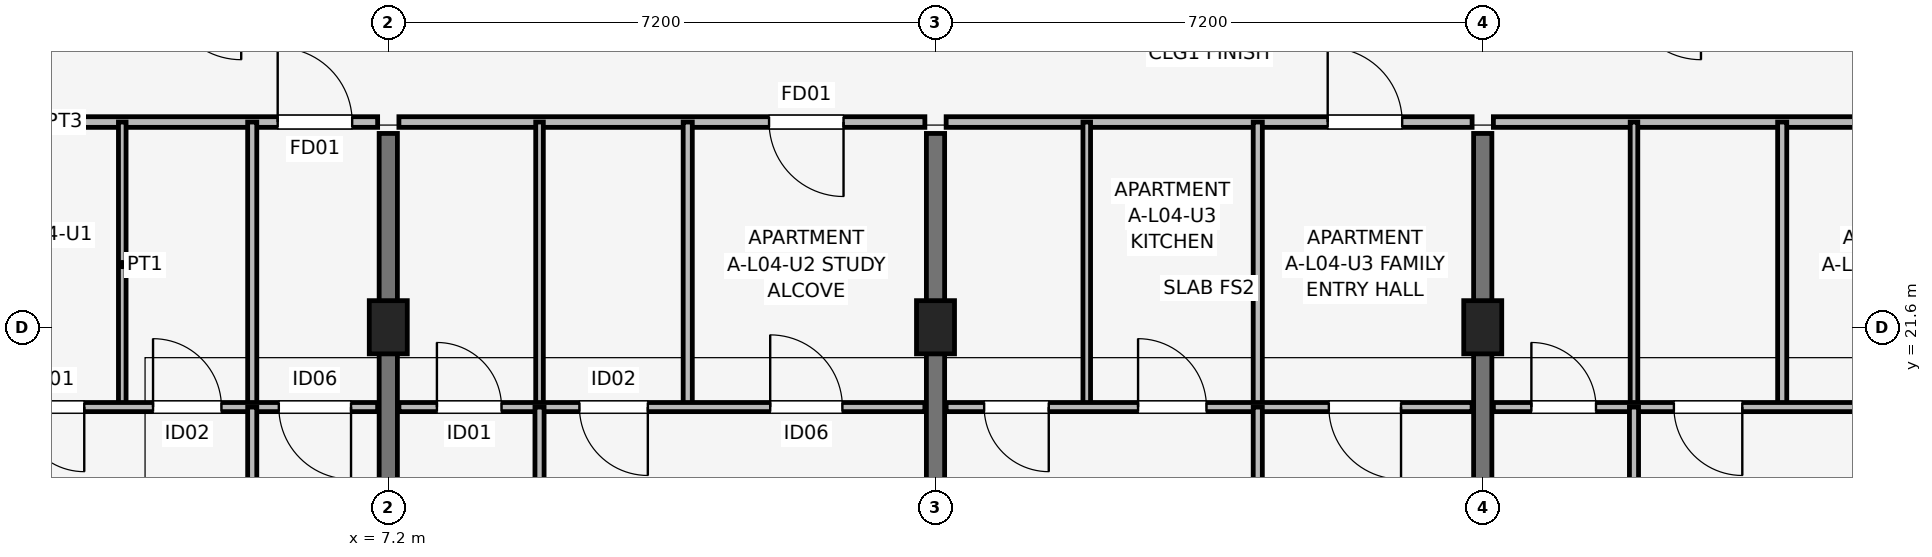
"""IFC4 building model, lengths in metres.
Left out: names, types, materials, properties, quantities, classifications, styles, units other than length and angle.
Written with IfcOpenShell. Run it as: python <this file> out.ifc"""

import sys

from ifc_helpers import new_model, si_unit, direction, frame, frame_2d, origin, origin_2d, place, context, subcontext, project, spatial, rectangle, extrude, element, fill, save


model = new_model("IFC4")
c1 = context("Model", 3, precision=1e-05, world=origin(), true_north=direction((0.0, 1.0)))
c2 = subcontext(c1, "Body", "Model", "MODEL_VIEW")
j1 = project(units=[si_unit("LENGTHUNIT", "METRE"), si_unit("PLANEANGLEUNIT", "RADIAN")], contexts=[c1])
p1 = place(None, origin())
s1 = spatial("IfcSite", under=j1, at=p1, CompositionType="ELEMENT")
p2 = place(p1, origin())
s2 = spatial("IfcBuilding", under=s1, at=p2, CompositionType="ELEMENT")
p3 = place(p2, frame((0.0, 0.0, 15.0)))
s3 = spatial("IfcBuildingStorey", under=s2, at=p3, CompositionType="ELEMENT", Elevation=15.0)
for number, where, z_axis, x_axis in (
    (1, (7.2, 21.6, 0.0), (0.0, 0.0, 1.0), (1.0, 0.0, 0.0)),
    (2, (14.4, 21.6, 0.0), (0.0, 0.0, 1.0), (1.0, 0.0, 0.0)),
    (3, (21.6, 21.6, 0.0), (0.0, 0.0, 1.0), (1.0, 0.0, 0.0)),
):
    element("IfcColumn", number, at=place(p3, frame(where, z_axis=z_axis, x_axis=x_axis)), inside=s3, PredefinedType="COLUMN", context=c2, shape_type="SweptSolid", body=[
        extrude(rectangle(XDim=0.5, YDim=0.7, at=origin_2d()), origin(), (0.0, 0.0, 1.0), 3.15),
    ])
for number, where, z_axis, x_axis in (
    (4, (7.2, 14.75, 0.0), (0.0, 0.0, 1.0), (0.0, 1.0, 0.0)),
    (5, (14.4, 14.75, 0.0), (0.0, 0.0, 1.0), (0.0, 1.0, 0.0)),
    (6, (21.6, 14.75, 0.0), (0.0, 0.0, 1.0), (0.0, 1.0, 0.0)),
):
    element("IfcWall", number, at=place(p3, frame(where, z_axis=z_axis, x_axis=x_axis)), inside=s3, PredefinedType="SHEAR", context=c2, shape_type="SweptSolid", body=[
        extrude(rectangle(XDim=9.4, YDim=0.24, at=frame_2d((4.7, 0.0))), origin(), (0.0, 0.0, 1.0), 3.15),
    ])
p4 = place(p3, frame((0.14, 24.3, 0.0), z_axis=(0.0, 0.0, 1.0), x_axis=(1.0, 0.0, 0.0)))
e7 = element("IfcWall", 7, at=p4, inside=s3, PredefinedType="PARTITIONING", context=c2, shape_type="SweptSolid", body=[
    extrude(rectangle(XDim=6.92, YDim=0.14, at=frame_2d((3.46, 0.0))), origin(), (0.0, 0.0, 1.0), 2.38),
])
p5 = place(p4, frame((5.605, 0.0, 0.0)))
e8 = element("IfcOpeningElement", 8, at=p5, cuts=e7, PredefinedType="OPENING", context=c2, shape_type="SweptSolid", body=[
    extrude(rectangle(XDim=0.98, YDim=2.1, at=frame_2d((0.49, 1.05))), frame((0.0, 0.08, 0.0), z_axis=(0.0, -1.0, 0.0), x_axis=(1.0, 0.0, 0.0)), (0.0, 0.0, 1.0), 0.16),
])
p6 = place(p3, frame((3.7, 20.55, 0.0), z_axis=(0.0, 0.0, 1.0), x_axis=(0.0, 1.0, 0.0)))
e9 = element("IfcWall", 9, at=p6, inside=s3, PredefinedType="PARTITIONING", context=c2, shape_type="SweptSolid", body=[
    extrude(rectangle(XDim=3.75, YDim=0.1, at=frame_2d((1.875, 0.0))), origin(), (0.0, 0.0, 1.0), 2.375),
])
p7 = place(p3, frame((5.41, 20.55, 0.0), z_axis=(0.0, 0.0, 1.0), x_axis=(0.0, 1.0, 0.0)))
e10 = element("IfcWall", 10, at=p7, inside=s3, PredefinedType="PARTITIONING", context=c2, shape_type="SweptSolid", body=[
    extrude(rectangle(XDim=3.75, YDim=0.12, at=frame_2d((1.875, 0.0))), origin(), (0.0, 0.0, 1.0), 2.375),
])
p8 = place(p3, frame((0.14, 20.55, 0.0), z_axis=(0.0, 0.0, 1.0), x_axis=(1.0, 0.0, 0.0)))
e11 = element("IfcWall", 11, at=p8, inside=s3, PredefinedType="PARTITIONING", context=c2, shape_type="SweptSolid", body=[
    extrude(rectangle(XDim=6.92, YDim=0.12, at=frame_2d((3.46, 0.0))), origin(), (0.0, 0.0, 1.0), 2.38),
])
p9 = place(p8, frame((3.06, 0.0, 0.0), z_axis=(0.0, 0.0, 1.0), x_axis=(-1.0, 0.0, 0.0)))
e12 = element("IfcOpeningElement", 12, at=p9, cuts=e11, PredefinedType="OPENING", context=c2, shape_type="SweptSolid", body=[
    extrude(rectangle(XDim=0.85, YDim=2.08, at=frame_2d((0.425, 1.04))), frame((0.0, 0.07, 0.0), z_axis=(0.0, -1.0, 0.0), x_axis=(1.0, 0.0, 0.0)), (0.0, 0.0, 1.0), 0.14),
])
p10 = place(p8, frame((3.965, 0.0, 0.0)))
e13 = element("IfcOpeningElement", 13, at=p10, cuts=e11, PredefinedType="OPENING", context=c2, shape_type="SweptSolid", body=[
    extrude(rectangle(XDim=0.9, YDim=2.08, at=frame_2d((0.45, 1.04))), frame((0.0, 0.07, 0.0), z_axis=(0.0, -1.0, 0.0), x_axis=(1.0, 0.0, 0.0)), (0.0, 0.0, 1.0), 0.14),
])
p11 = place(p8, frame((6.57, 0.0, 0.0), z_axis=(0.0, 0.0, 1.0), x_axis=(-1.0, 0.0, 0.0)))
e14 = element("IfcOpeningElement", 14, at=p11, cuts=e11, PredefinedType="OPENING", context=c2, shape_type="SweptSolid", body=[
    extrude(rectangle(XDim=0.95, YDim=2.08, at=frame_2d((0.475, 1.04))), frame((0.0, 0.07, 0.0), z_axis=(0.0, -1.0, 0.0), x_axis=(1.0, 0.0, 0.0)), (0.0, 0.0, 1.0), 0.14),
])
p12 = place(p3, frame((5.41, 14.7, 0.0), z_axis=(0.0, 0.0, 1.0), x_axis=(0.0, 1.0, 0.0)))
e15 = element("IfcWall", 15, at=p12, inside=s3, PredefinedType="PARTITIONING", context=c2, shape_type="SweptSolid", body=[
    extrude(rectangle(XDim=5.85, YDim=0.12, at=frame_2d((2.925, 0.0))), origin(), (0.0, 0.0, 1.0), 2.38),
])
p13 = place(p12, frame((2.475, 0.0, 0.0)))
e16 = element("IfcOpeningElement", 16, at=p13, cuts=e15, PredefinedType="OPENING", context=c2, shape_type="SweptSolid", body=[
    extrude(rectangle(XDim=0.9, YDim=2.08, at=frame_2d((0.45, 1.04))), frame((0.0, 0.07, 0.0), z_axis=(0.0, -1.0, 0.0), x_axis=(1.0, 0.0, 0.0)), (0.0, 0.0, 1.0), 0.14),
])
p14 = place(p3, frame((7.34, 24.3, 0.0), z_axis=(0.0, 0.0, 1.0), x_axis=(1.0, 0.0, 0.0)))
e17 = element("IfcWall", 17, at=p14, inside=s3, PredefinedType="PARTITIONING", context=c2, shape_type="SweptSolid", body=[
    extrude(rectangle(XDim=6.92, YDim=0.14, at=frame_2d((3.46, 0.0))), origin(), (0.0, 0.0, 1.0), 2.38),
])
p15 = place(p14, frame((5.85, 0.0, 0.0), z_axis=(0.0, 0.0, 1.0), x_axis=(-1.0, 0.0, 0.0)))
e18 = element("IfcOpeningElement", 18, at=p15, cuts=e17, PredefinedType="OPENING", context=c2, shape_type="SweptSolid", body=[
    extrude(rectangle(XDim=0.98, YDim=2.1, at=frame_2d((0.49, 1.05))), frame((0.0, 0.08, 0.0), z_axis=(0.0, -1.0, 0.0), x_axis=(1.0, 0.0, 0.0)), (0.0, 0.0, 1.0), 0.16),
])
p16 = place(p3, frame((9.19, 20.55, 0.0), z_axis=(0.0, 0.0, 1.0), x_axis=(0.0, 1.0, 0.0)))
e19 = element("IfcWall", 19, at=p16, inside=s3, PredefinedType="PARTITIONING", context=c2, shape_type="SweptSolid", body=[
    extrude(rectangle(XDim=3.75, YDim=0.1, at=frame_2d((1.875, 0.0))), origin(), (0.0, 0.0, 1.0), 2.375),
])
p17 = place(p3, frame((11.14, 20.55, 0.0), z_axis=(0.0, 0.0, 1.0), x_axis=(0.0, 1.0, 0.0)))
e20 = element("IfcWall", 20, at=p17, inside=s3, PredefinedType="PARTITIONING", context=c2, shape_type="SweptSolid", body=[
    extrude(rectangle(XDim=3.75, YDim=0.12, at=frame_2d((1.875, 0.0))), origin(), (0.0, 0.0, 1.0), 2.375),
])
p18 = place(p3, frame((7.34, 20.55, 0.0), z_axis=(0.0, 0.0, 1.0), x_axis=(1.0, 0.0, 0.0)))
e21 = element("IfcWall", 21, at=p18, inside=s3, PredefinedType="PARTITIONING", context=c2, shape_type="SweptSolid", body=[
    extrude(rectangle(XDim=6.92, YDim=0.12, at=frame_2d((3.46, 0.0))), origin(), (0.0, 0.0, 1.0), 2.38),
])
p19 = place(p18, frame((0.5, 0.0, 0.0)))
e22 = element("IfcOpeningElement", 22, at=p19, cuts=e21, PredefinedType="OPENING", context=c2, shape_type="SweptSolid", body=[
    extrude(rectangle(XDim=0.85, YDim=2.08, at=frame_2d((0.425, 1.04))), frame((0.0, 0.07, 0.0), z_axis=(0.0, -1.0, 0.0), x_axis=(1.0, 0.0, 0.0)), (0.0, 0.0, 1.0), 0.14),
])
p20 = place(p18, frame((3.275, 0.0, 0.0), z_axis=(0.0, 0.0, 1.0), x_axis=(-1.0, 0.0, 0.0)))
e23 = element("IfcOpeningElement", 23, at=p20, cuts=e21, PredefinedType="OPENING", context=c2, shape_type="SweptSolid", body=[
    extrude(rectangle(XDim=0.9, YDim=2.08, at=frame_2d((0.45, 1.04))), frame((0.0, 0.07, 0.0), z_axis=(0.0, -1.0, 0.0), x_axis=(1.0, 0.0, 0.0)), (0.0, 0.0, 1.0), 0.14),
])
p21 = place(p18, frame((4.885, 0.0, 0.0)))
e24 = element("IfcOpeningElement", 24, at=p21, cuts=e21, PredefinedType="OPENING", context=c2, shape_type="SweptSolid", body=[
    extrude(rectangle(XDim=0.95, YDim=2.08, at=frame_2d((0.475, 1.04))), frame((0.0, 0.07, 0.0), z_axis=(0.0, -1.0, 0.0), x_axis=(1.0, 0.0, 0.0)), (0.0, 0.0, 1.0), 0.14),
])
p22 = place(p3, frame((9.19, 14.7, 0.0), z_axis=(0.0, 0.0, 1.0), x_axis=(0.0, 1.0, 0.0)))
e25 = element("IfcWall", 25, at=p22, inside=s3, PredefinedType="PARTITIONING", context=c2, shape_type="SweptSolid", body=[
    extrude(rectangle(XDim=5.85, YDim=0.12, at=frame_2d((2.925, 0.0))), origin(), (0.0, 0.0, 1.0), 2.38),
])
p23 = place(p22, frame((3.375, 0.0, 0.0), z_axis=(0.0, 0.0, 1.0), x_axis=(-1.0, 0.0, 0.0)))
e26 = element("IfcOpeningElement", 26, at=p23, cuts=e25, PredefinedType="OPENING", context=c2, shape_type="SweptSolid", body=[
    extrude(rectangle(XDim=0.9, YDim=2.08, at=frame_2d((0.45, 1.04))), frame((0.0, 0.07, 0.0), z_axis=(0.0, -1.0, 0.0), x_axis=(1.0, 0.0, 0.0)), (0.0, 0.0, 1.0), 0.14),
])
p24 = place(p3, frame((14.54, 24.3, 0.0), z_axis=(0.0, 0.0, 1.0), x_axis=(1.0, 0.0, 0.0)))
e27 = element("IfcWall", 27, at=p24, inside=s3, PredefinedType="PARTITIONING", context=c2, shape_type="SweptSolid", body=[
    extrude(rectangle(XDim=6.92, YDim=0.14, at=frame_2d((3.46, 0.0))), origin(), (0.0, 0.0, 1.0), 2.38),
])
p25 = place(p24, frame((5.02, 0.0, 0.0)))
e28 = element("IfcOpeningElement", 28, at=p25, cuts=e27, PredefinedType="OPENING", context=c2, shape_type="SweptSolid", body=[
    extrude(rectangle(XDim=0.98, YDim=2.1, at=frame_2d((0.49, 1.05))), frame((0.0, 0.08, 0.0), z_axis=(0.0, -1.0, 0.0), x_axis=(1.0, 0.0, 0.0)), (0.0, 0.0, 1.0), 0.16),
])
p26 = place(p3, frame((16.39, 20.55, 0.0), z_axis=(0.0, 0.0, 1.0), x_axis=(0.0, 1.0, 0.0)))
e29 = element("IfcWall", 29, at=p26, inside=s3, PredefinedType="PARTITIONING", context=c2, shape_type="SweptSolid", body=[
    extrude(rectangle(XDim=3.75, YDim=0.1, at=frame_2d((1.875, 0.0))), origin(), (0.0, 0.0, 1.0), 2.375),
])
p27 = place(p3, frame((18.64, 20.55, 0.0), z_axis=(0.0, 0.0, 1.0), x_axis=(0.0, 1.0, 0.0)))
e30 = element("IfcWall", 30, at=p27, inside=s3, PredefinedType="PARTITIONING", context=c2, shape_type="SweptSolid", body=[
    extrude(rectangle(XDim=3.75, YDim=0.12, at=frame_2d((1.875, 0.0))), origin(), (0.0, 0.0, 1.0), 2.375),
])
p28 = place(p3, frame((14.54, 20.55, 0.0), z_axis=(0.0, 0.0, 1.0), x_axis=(1.0, 0.0, 0.0)))
e31 = element("IfcWall", 31, at=p28, inside=s3, PredefinedType="PARTITIONING", context=c2, shape_type="SweptSolid", body=[
    extrude(rectangle(XDim=6.92, YDim=0.12, at=frame_2d((3.46, 0.0))), origin(), (0.0, 0.0, 1.0), 2.38),
])
p29 = place(p28, frame((1.35, 0.0, 0.0), z_axis=(0.0, 0.0, 1.0), x_axis=(-1.0, 0.0, 0.0)))
e32 = element("IfcOpeningElement", 32, at=p29, cuts=e31, PredefinedType="OPENING", context=c2, shape_type="SweptSolid", body=[
    extrude(rectangle(XDim=0.85, YDim=2.08, at=frame_2d((0.425, 1.04))), frame((0.0, 0.07, 0.0), z_axis=(0.0, -1.0, 0.0), x_axis=(1.0, 0.0, 0.0)), (0.0, 0.0, 1.0), 0.14),
])
p30 = place(p28, frame((2.525, 0.0, 0.0)))
e33 = element("IfcOpeningElement", 33, at=p30, cuts=e31, PredefinedType="OPENING", context=c2, shape_type="SweptSolid", body=[
    extrude(rectangle(XDim=0.9, YDim=2.08, at=frame_2d((0.45, 1.04))), frame((0.0, 0.07, 0.0), z_axis=(0.0, -1.0, 0.0), x_axis=(1.0, 0.0, 0.0)), (0.0, 0.0, 1.0), 0.14),
])
p31 = place(p28, frame((5.985, 0.0, 0.0), z_axis=(0.0, 0.0, 1.0), x_axis=(-1.0, 0.0, 0.0)))
e34 = element("IfcOpeningElement", 34, at=p31, cuts=e31, PredefinedType="OPENING", context=c2, shape_type="SweptSolid", body=[
    extrude(rectangle(XDim=0.95, YDim=2.08, at=frame_2d((0.475, 1.04))), frame((0.0, 0.07, 0.0), z_axis=(0.0, -1.0, 0.0), x_axis=(1.0, 0.0, 0.0)), (0.0, 0.0, 1.0), 0.14),
])
p32 = place(p3, frame((18.64, 14.7, 0.0), z_axis=(0.0, 0.0, 1.0), x_axis=(0.0, 1.0, 0.0)))
e35 = element("IfcWall", 35, at=p32, inside=s3, PredefinedType="PARTITIONING", context=c2, shape_type="SweptSolid", body=[
    extrude(rectangle(XDim=5.85, YDim=0.12, at=frame_2d((2.925, 0.0))), origin(), (0.0, 0.0, 1.0), 2.38),
])
p33 = place(p32, frame((2.475, 0.0, 0.0)))
e36 = element("IfcOpeningElement", 36, at=p33, cuts=e35, PredefinedType="OPENING", context=c2, shape_type="SweptSolid", body=[
    extrude(rectangle(XDim=0.9, YDim=2.08, at=frame_2d((0.45, 1.04))), frame((0.0, 0.07, 0.0), z_axis=(0.0, -1.0, 0.0), x_axis=(1.0, 0.0, 0.0)), (0.0, 0.0, 1.0), 0.14),
])
p34 = place(p3, frame((21.74, 24.3, 0.0), z_axis=(0.0, 0.0, 1.0), x_axis=(1.0, 0.0, 0.0)))
e37 = element("IfcWall", 37, at=p34, inside=s3, PredefinedType="PARTITIONING", context=c2, shape_type="SweptSolid", body=[
    extrude(rectangle(XDim=6.92, YDim=0.14, at=frame_2d((3.46, 0.0))), origin(), (0.0, 0.0, 1.0), 2.38),
])
p35 = place(p34, frame((5.85, 0.0, 0.0), z_axis=(0.0, 0.0, 1.0), x_axis=(-1.0, 0.0, 0.0)))
e38 = element("IfcOpeningElement", 38, at=p35, cuts=e37, PredefinedType="OPENING", context=c2, shape_type="SweptSolid", body=[
    extrude(rectangle(XDim=0.98, YDim=2.1, at=frame_2d((0.49, 1.05))), frame((0.0, 0.08, 0.0), z_axis=(0.0, -1.0, 0.0), x_axis=(1.0, 0.0, 0.0)), (0.0, 0.0, 1.0), 0.16),
])
p36 = place(p3, frame((23.59, 20.55, 0.0), z_axis=(0.0, 0.0, 1.0), x_axis=(0.0, 1.0, 0.0)))
e39 = element("IfcWall", 39, at=p36, inside=s3, PredefinedType="PARTITIONING", context=c2, shape_type="SweptSolid", body=[
    extrude(rectangle(XDim=3.75, YDim=0.1, at=frame_2d((1.875, 0.0))), origin(), (0.0, 0.0, 1.0), 2.375),
])
p37 = place(p3, frame((25.54, 20.55, 0.0), z_axis=(0.0, 0.0, 1.0), x_axis=(0.0, 1.0, 0.0)))
e40 = element("IfcWall", 40, at=p37, inside=s3, PredefinedType="PARTITIONING", context=c2, shape_type="SweptSolid", body=[
    extrude(rectangle(XDim=3.75, YDim=0.12, at=frame_2d((1.875, 0.0))), origin(), (0.0, 0.0, 1.0), 2.375),
])
p38 = place(p3, frame((21.74, 20.55, 0.0), z_axis=(0.0, 0.0, 1.0), x_axis=(1.0, 0.0, 0.0)))
e41 = element("IfcWall", 41, at=p38, inside=s3, PredefinedType="PARTITIONING", context=c2, shape_type="SweptSolid", body=[
    extrude(rectangle(XDim=6.92, YDim=0.12, at=frame_2d((3.46, 0.0))), origin(), (0.0, 0.0, 1.0), 2.38),
])
p39 = place(p38, frame((0.5, 0.0, 0.0)))
e42 = element("IfcOpeningElement", 42, at=p39, cuts=e41, PredefinedType="OPENING", context=c2, shape_type="SweptSolid", body=[
    extrude(rectangle(XDim=0.85, YDim=2.08, at=frame_2d((0.425, 1.04))), frame((0.0, 0.07, 0.0), z_axis=(0.0, -1.0, 0.0), x_axis=(1.0, 0.0, 0.0)), (0.0, 0.0, 1.0), 0.14),
])
p40 = place(p38, frame((3.275, 0.0, 0.0), z_axis=(0.0, 0.0, 1.0), x_axis=(-1.0, 0.0, 0.0)))
e43 = element("IfcOpeningElement", 43, at=p40, cuts=e41, PredefinedType="OPENING", context=c2, shape_type="SweptSolid", body=[
    extrude(rectangle(XDim=0.9, YDim=2.08, at=frame_2d((0.45, 1.04))), frame((0.0, 0.07, 0.0), z_axis=(0.0, -1.0, 0.0), x_axis=(1.0, 0.0, 0.0)), (0.0, 0.0, 1.0), 0.14),
])
p41 = place(p38, frame((4.885, 0.0, 0.0)))
e44 = element("IfcOpeningElement", 44, at=p41, cuts=e41, PredefinedType="OPENING", context=c2, shape_type="SweptSolid", body=[
    extrude(rectangle(XDim=0.95, YDim=2.08, at=frame_2d((0.475, 1.04))), frame((0.0, 0.07, 0.0), z_axis=(0.0, -1.0, 0.0), x_axis=(1.0, 0.0, 0.0)), (0.0, 0.0, 1.0), 0.14),
])
p42 = place(p3, frame((23.59, 14.7, 0.0), z_axis=(0.0, 0.0, 1.0), x_axis=(0.0, 1.0, 0.0)))
e45 = element("IfcWall", 45, at=p42, inside=s3, PredefinedType="PARTITIONING", context=c2, shape_type="SweptSolid", body=[
    extrude(rectangle(XDim=5.85, YDim=0.12, at=frame_2d((2.925, 0.0))), origin(), (0.0, 0.0, 1.0), 2.38),
])
p43 = place(p42, frame((3.375, 0.0, 0.0), z_axis=(0.0, 0.0, 1.0), x_axis=(-1.0, 0.0, 0.0)))
e46 = element("IfcOpeningElement", 46, at=p43, cuts=e45, PredefinedType="OPENING", context=c2, shape_type="SweptSolid", body=[
    extrude(rectangle(XDim=0.9, YDim=2.08, at=frame_2d((0.45, 1.04))), frame((0.0, 0.07, 0.0), z_axis=(0.0, -1.0, 0.0), x_axis=(1.0, 0.0, 0.0)), (0.0, 0.0, 1.0), 0.14),
])
p44 = place(p5, origin())
e47 = element("IfcDoor", 47, at=p44, inside=s3, OperationType="SINGLE_SWING_LEFT", PredefinedType="DOOR", context=c2, shape_type="SweptSolid", body=[
    extrude(rectangle(XDim=0.98, YDim=2.1, at=frame_2d((0.49, 1.05))), frame((0.0, 0.025, 0.0), z_axis=(0.0, -1.0, 0.0), x_axis=(1.0, 0.0, 0.0)), (0.0, 0.0, 1.0), 0.05),
])
fill(e8, e47)
p45 = place(p9, origin())
e48 = element("IfcDoor", 48, at=p45, inside=s3, OperationType="SINGLE_SWING_RIGHT", PredefinedType="DOOR", context=c2, shape_type="SweptSolid", body=[
    extrude(rectangle(XDim=0.85, YDim=2.08, at=frame_2d((0.425, 1.04))), frame((0.0, 0.025, 0.0), z_axis=(0.0, -1.0, 0.0), x_axis=(1.0, 0.0, 0.0)), (0.0, 0.0, 1.0), 0.05),
])
fill(e12, e48)
p46 = place(p10, origin())
e49 = element("IfcDoor", 49, at=p46, inside=s3, OperationType="SINGLE_SWING_LEFT", PredefinedType="DOOR", context=c2, shape_type="SweptSolid", body=[
    extrude(rectangle(XDim=0.9, YDim=2.08, at=frame_2d((0.45, 1.04))), frame((0.0, 0.025, 0.0), z_axis=(0.0, -1.0, 0.0), x_axis=(1.0, 0.0, 0.0)), (0.0, 0.0, 1.0), 0.05),
])
fill(e13, e49)
p47 = place(p11, origin())
e50 = element("IfcDoor", 50, at=p47, inside=s3, OperationType="SINGLE_SWING_RIGHT", PredefinedType="DOOR", context=c2, shape_type="SweptSolid", body=[
    extrude(rectangle(XDim=0.95, YDim=2.08, at=frame_2d((0.475, 1.04))), frame((0.0, 0.025, 0.0), z_axis=(0.0, -1.0, 0.0), x_axis=(1.0, 0.0, 0.0)), (0.0, 0.0, 1.0), 0.05),
])
fill(e14, e50)
p48 = place(p15, origin())
e51 = element("IfcDoor", 51, at=p48, inside=s3, OperationType="SINGLE_SWING_RIGHT", PredefinedType="DOOR", context=c2, shape_type="SweptSolid", body=[
    extrude(rectangle(XDim=0.98, YDim=2.1, at=frame_2d((0.49, 1.05))), frame((0.0, 0.025, 0.0), z_axis=(0.0, -1.0, 0.0), x_axis=(1.0, 0.0, 0.0)), (0.0, 0.0, 1.0), 0.05),
])
fill(e18, e51)
p49 = place(p19, origin())
e52 = element("IfcDoor", 52, at=p49, inside=s3, OperationType="SINGLE_SWING_LEFT", PredefinedType="DOOR", context=c2, shape_type="SweptSolid", body=[
    extrude(rectangle(XDim=0.85, YDim=2.08, at=frame_2d((0.425, 1.04))), frame((0.0, 0.025, 0.0), z_axis=(0.0, -1.0, 0.0), x_axis=(1.0, 0.0, 0.0)), (0.0, 0.0, 1.0), 0.05),
])
fill(e22, e52)
p50 = place(p20, origin())
e53 = element("IfcDoor", 53, at=p50, inside=s3, OperationType="SINGLE_SWING_RIGHT", PredefinedType="DOOR", context=c2, shape_type="SweptSolid", body=[
    extrude(rectangle(XDim=0.9, YDim=2.08, at=frame_2d((0.45, 1.04))), frame((0.0, 0.025, 0.0), z_axis=(0.0, -1.0, 0.0), x_axis=(1.0, 0.0, 0.0)), (0.0, 0.0, 1.0), 0.05),
])
fill(e23, e53)
p51 = place(p21, origin())
e54 = element("IfcDoor", 54, at=p51, inside=s3, OperationType="SINGLE_SWING_LEFT", PredefinedType="DOOR", context=c2, shape_type="SweptSolid", body=[
    extrude(rectangle(XDim=0.95, YDim=2.08, at=frame_2d((0.475, 1.04))), frame((0.0, 0.025, 0.0), z_axis=(0.0, -1.0, 0.0), x_axis=(1.0, 0.0, 0.0)), (0.0, 0.0, 1.0), 0.05),
])
fill(e24, e54)
p52 = place(p25, origin())
e55 = element("IfcDoor", 55, at=p52, inside=s3, OperationType="SINGLE_SWING_LEFT", PredefinedType="DOOR", context=c2, shape_type="SweptSolid", body=[
    extrude(rectangle(XDim=0.98, YDim=2.1, at=frame_2d((0.49, 1.05))), frame((0.0, 0.025, 0.0), z_axis=(0.0, -1.0, 0.0), x_axis=(1.0, 0.0, 0.0)), (0.0, 0.0, 1.0), 0.05),
])
fill(e28, e55)
p53 = place(p29, origin())
e56 = element("IfcDoor", 56, at=p53, inside=s3, OperationType="SINGLE_SWING_RIGHT", PredefinedType="DOOR", context=c2, shape_type="SweptSolid", body=[
    extrude(rectangle(XDim=0.85, YDim=2.08, at=frame_2d((0.425, 1.04))), frame((0.0, 0.025, 0.0), z_axis=(0.0, -1.0, 0.0), x_axis=(1.0, 0.0, 0.0)), (0.0, 0.0, 1.0), 0.05),
])
fill(e32, e56)
p54 = place(p30, origin())
e57 = element("IfcDoor", 57, at=p54, inside=s3, OperationType="SINGLE_SWING_LEFT", PredefinedType="DOOR", context=c2, shape_type="SweptSolid", body=[
    extrude(rectangle(XDim=0.9, YDim=2.08, at=frame_2d((0.45, 1.04))), frame((0.0, 0.025, 0.0), z_axis=(0.0, -1.0, 0.0), x_axis=(1.0, 0.0, 0.0)), (0.0, 0.0, 1.0), 0.05),
])
fill(e33, e57)
p55 = place(p31, origin())
e58 = element("IfcDoor", 58, at=p55, inside=s3, OperationType="SINGLE_SWING_RIGHT", PredefinedType="DOOR", context=c2, shape_type="SweptSolid", body=[
    extrude(rectangle(XDim=0.95, YDim=2.08, at=frame_2d((0.475, 1.04))), frame((0.0, 0.025, 0.0), z_axis=(0.0, -1.0, 0.0), x_axis=(1.0, 0.0, 0.0)), (0.0, 0.0, 1.0), 0.05),
])
fill(e34, e58)
p56 = place(p39, origin())
e59 = element("IfcDoor", 59, at=p56, inside=s3, OperationType="SINGLE_SWING_LEFT", PredefinedType="DOOR", context=c2, shape_type="SweptSolid", body=[
    extrude(rectangle(XDim=0.85, YDim=2.08, at=frame_2d((0.425, 1.04))), frame((0.0, 0.025, 0.0), z_axis=(0.0, -1.0, 0.0), x_axis=(1.0, 0.0, 0.0)), (0.0, 0.0, 1.0), 0.05),
])
fill(e42, e59)
p57 = place(p40, origin())
e60 = element("IfcDoor", 60, at=p57, inside=s3, OperationType="SINGLE_SWING_RIGHT", PredefinedType="DOOR", context=c2, shape_type="SweptSolid", body=[
    extrude(rectangle(XDim=0.9, YDim=2.08, at=frame_2d((0.45, 1.04))), frame((0.0, 0.025, 0.0), z_axis=(0.0, -1.0, 0.0), x_axis=(1.0, 0.0, 0.0)), (0.0, 0.0, 1.0), 0.05),
])
fill(e43, e60)
save(model, sys.argv[1])
